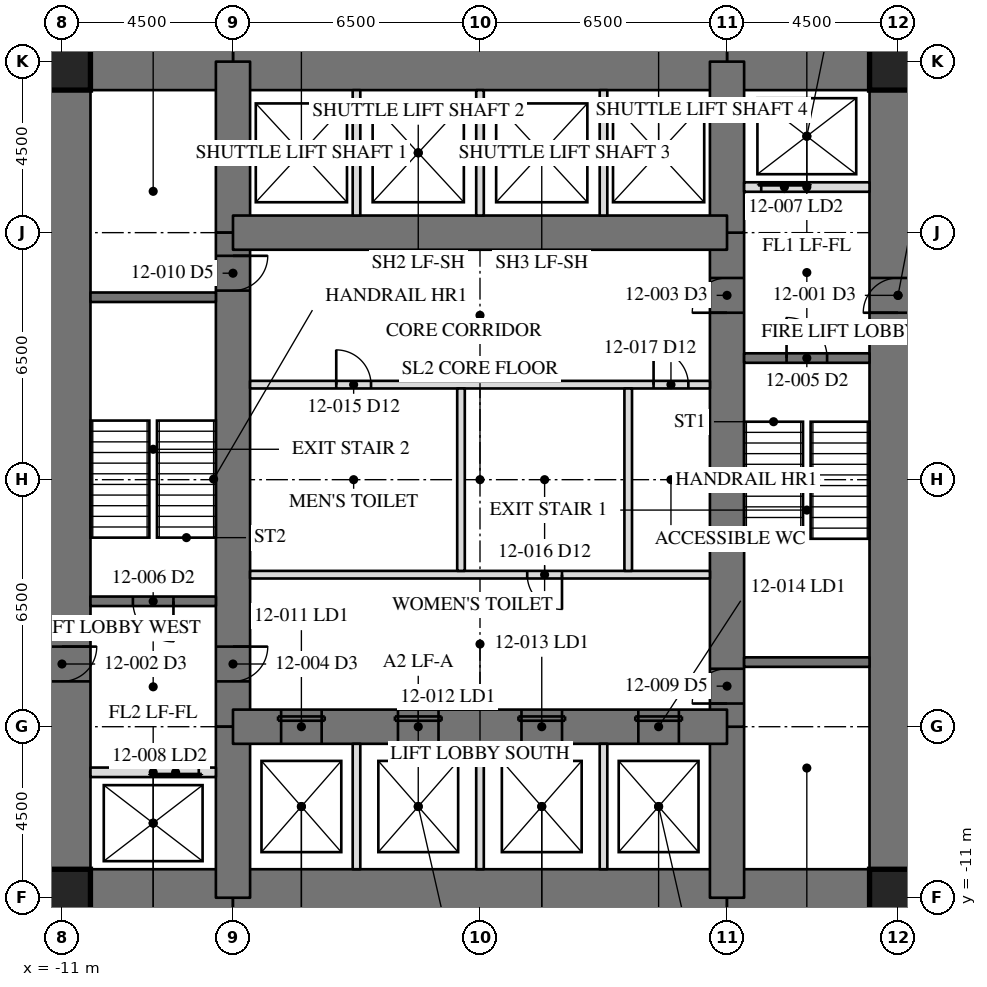
"""IFC4 building model, lengths in metres.
Left out: names, types, materials, properties, quantities, classifications, styles, units other than length and angle.
Written with IfcOpenShell. Run it as: python <this file> out.ifc"""

import sys

from ifc_helpers import new_model, si_unit, direction, frame, frame_2d, origin, origin_2d, place, context, subcontext, project, spatial, rectangle, hollow_rectangle, extrude, element, fill, save


model = new_model("IFC4")
c1 = context("Model", 3, precision=1e-05, world=origin(), true_north=direction((0.0, 1.0)))
c2 = subcontext(c1, "Body", "Model", "MODEL_VIEW")
j1 = project(units=[si_unit("LENGTHUNIT", "METRE"), si_unit("PLANEANGLEUNIT", "RADIAN")], contexts=[c1])
p1 = place(None, origin())
s1 = spatial("IfcSite", under=j1, at=p1, CompositionType="ELEMENT")
p2 = place(p1, origin())
s2 = spatial("IfcBuilding", under=s1, at=p2, CompositionType="ELEMENT")
p3 = place(p2, frame((0.0, 0.0, 52.9)))
s3 = spatial("IfcBuildingStorey", under=s2, at=p3, CompositionType="ELEMENT", Elevation=52.9)
p4 = place(p3, frame((11.0, -11.0, 0.0), z_axis=(0.0, 0.0, 1.0), x_axis=(0.0, 1.0, 0.0)))
e1 = element("IfcWall", 1, at=p4, inside=s3, PredefinedType="SHEAR", context=c2, shape_type="SweptSolid", body=[
    extrude(rectangle(XDim=22.0, YDim=1.5, at=frame_2d((11.0, 0.0))), origin(), (0.0, 0.0, 1.0), 4.1),
])
p5 = place(p4, frame((15.393, 0.0, 0.0)))
e2 = element("IfcOpeningElement", 2, at=p5, cuts=e1, PredefinedType="OPENING", context=c2, shape_type="SweptSolid", body=[
    extrude(rectangle(XDim=0.915, YDim=2.134, at=frame_2d((0.458, 1.067))), frame((0.0, 0.76, 0.0), z_axis=(0.0, -1.0, 0.0), x_axis=(1.0, 0.0, 0.0)), (0.0, 0.0, 1.0), 1.52),
])
p6 = place(p3, frame((-11.0, 11.0, 0.0), z_axis=(0.0, 0.0, 1.0), x_axis=(0.0, -1.0, 0.0)))
e3 = element("IfcWall", 3, at=p6, inside=s3, PredefinedType="SHEAR", context=c2, shape_type="SweptSolid", body=[
    extrude(rectangle(XDim=22.0, YDim=1.5, at=frame_2d((11.0, 0.0))), origin(), (0.0, 0.0, 1.0), 4.1),
])
p7 = place(p6, frame((15.393, 0.0, 0.0)))
e4 = element("IfcOpeningElement", 4, at=p7, cuts=e3, PredefinedType="OPENING", context=c2, shape_type="SweptSolid", body=[
    extrude(rectangle(XDim=0.915, YDim=2.134, at=frame_2d((0.458, 1.067))), frame((0.0, 0.76, 0.0), z_axis=(0.0, -1.0, 0.0), x_axis=(1.0, 0.0, 0.0)), (0.0, 0.0, 1.0), 1.52),
])
p8 = place(p3, frame((11.0, 11.0, 0.0), z_axis=(0.0, 0.0, 1.0), x_axis=(-1.0, 0.0, 0.0)))
e5 = element("IfcWall", 5, at=p8, inside=s3, PredefinedType="SHEAR", context=c2, shape_type="SweptSolid", body=[
    extrude(rectangle(XDim=4.5, YDim=1.5, at=frame_2d((2.25, 0.0))), origin(), (0.0, 0.0, 1.0), 4.1),
])
p9 = place(p3, frame((6.5, 11.0, 0.0), z_axis=(0.0, 0.0, 1.0), x_axis=(-1.0, 0.0, 0.0)))
e6 = element("IfcWall", 6, at=p9, inside=s3, PredefinedType="SHEAR", context=c2, shape_type="SweptSolid", body=[
    extrude(rectangle(XDim=13.0, YDim=1.5, at=frame_2d((6.5, 0.0))), origin(), (0.0, 0.0, 1.0), 4.1),
])
for number, where, z_axis, x_axis in (
    (7, (-6.5, 11.0, 0.0), (0.0, 0.0, 1.0), (-1.0, 0.0, 0.0)),
    (8, (-11.0, -11.0, 0.0), (0.0, 0.0, 1.0), (1.0, 0.0, 0.0)),
):
    element("IfcWall", number, at=place(p3, frame(where, z_axis=z_axis, x_axis=x_axis)), inside=s3, PredefinedType="SHEAR", context=c2, shape_type="SweptSolid", body=[
        extrude(rectangle(XDim=4.5, YDim=1.5, at=frame_2d((2.25, 0.0))), origin(), (0.0, 0.0, 1.0), 4.1),
    ])
p10 = place(p3, frame((-6.5, -11.0, 0.0), z_axis=(0.0, 0.0, 1.0), x_axis=(1.0, 0.0, 0.0)))
e9 = element("IfcWall", 9, at=p10, inside=s3, PredefinedType="SHEAR", context=c2, shape_type="SweptSolid", body=[
    extrude(rectangle(XDim=13.0, YDim=1.5, at=frame_2d((6.5, 0.0))), origin(), (0.0, 0.0, 1.0), 4.1),
])
p11 = place(p3, frame((6.5, -11.0, 0.0), z_axis=(0.0, 0.0, 1.0), x_axis=(1.0, 0.0, 0.0)))
e10 = element("IfcWall", 10, at=p11, inside=s3, PredefinedType="SHEAR", context=c2, shape_type="SweptSolid", body=[
    extrude(rectangle(XDim=4.5, YDim=1.5, at=frame_2d((2.25, 0.0))), origin(), (0.0, 0.0, 1.0), 4.1),
])
p12 = place(p3, frame((6.5, -11.0, 0.0), z_axis=(0.0, 0.0, 1.0), x_axis=(0.0, 1.0, 0.0)))
e11 = element("IfcWall", 11, at=p12, inside=s3, PredefinedType="SHEAR", context=c2, shape_type="SweptSolid", body=[
    extrude(rectangle(XDim=4.5, YDim=0.9, at=frame_2d((2.25, 0.0))), origin(), (0.0, 0.0, 1.0), 4.1),
])
p13 = place(p3, frame((6.5, -6.5, 0.0), z_axis=(0.0, 0.0, 1.0), x_axis=(0.0, 1.0, 0.0)))
e12 = element("IfcWall", 12, at=p13, inside=s3, PredefinedType="SHEAR", context=c2, shape_type="SweptSolid", body=[
    extrude(rectangle(XDim=13.0, YDim=0.9, at=frame_2d((6.5, 0.0))), origin(), (0.0, 0.0, 1.0), 4.1),
])
p14 = place(p13, frame((10.893, 0.0, 0.0)))
e13 = element("IfcOpeningElement", 13, at=p14, cuts=e12, PredefinedType="OPENING", context=c2, shape_type="SweptSolid", body=[
    extrude(rectangle(XDim=0.915, YDim=2.134, at=frame_2d((0.458, 1.067))), frame((0.0, 0.46, 0.0), z_axis=(0.0, -1.0, 0.0), x_axis=(1.0, 0.0, 0.0)), (0.0, 0.0, 1.0), 0.92),
])
p15 = place(p13, frame((0.61, 0.0, 0.0)))
e14 = element("IfcOpeningElement", 14, at=p15, cuts=e12, PredefinedType="OPENING", context=c2, shape_type="SweptSolid", body=[
    extrude(rectangle(XDim=0.915, YDim=2.134, at=frame_2d((0.458, 1.067))), frame((0.0, 0.46, 0.0), z_axis=(0.0, -1.0, 0.0), x_axis=(1.0, 0.0, 0.0)), (0.0, 0.0, 1.0), 0.92),
])
for number, where, z_axis, x_axis in (
    (15, (6.5, 6.5, 0.0), (0.0, 0.0, 1.0), (0.0, 1.0, 0.0)),
    (16, (-6.5, 11.0, 0.0), (0.0, 0.0, 1.0), (0.0, -1.0, 0.0)),
):
    element("IfcWall", number, at=place(p3, frame(where, z_axis=z_axis, x_axis=x_axis)), inside=s3, PredefinedType="SHEAR", context=c2, shape_type="SweptSolid", body=[
        extrude(rectangle(XDim=4.5, YDim=0.9, at=frame_2d((2.25, 0.0))), origin(), (0.0, 0.0, 1.0), 4.1),
    ])
p16 = place(p3, frame((-6.5, 6.5, 0.0), z_axis=(0.0, 0.0, 1.0), x_axis=(0.0, -1.0, 0.0)))
e17 = element("IfcWall", 17, at=p16, inside=s3, PredefinedType="SHEAR", context=c2, shape_type="SweptSolid", body=[
    extrude(rectangle(XDim=13.0, YDim=0.9, at=frame_2d((6.5, 0.0))), origin(), (0.0, 0.0, 1.0), 4.1),
])
p17 = place(p16, frame((10.893, 0.0, 0.0)))
e18 = element("IfcOpeningElement", 18, at=p17, cuts=e17, PredefinedType="OPENING", context=c2, shape_type="SweptSolid", body=[
    extrude(rectangle(XDim=0.915, YDim=2.134, at=frame_2d((0.458, 1.067))), frame((0.0, 0.46, 0.0), z_axis=(0.0, -1.0, 0.0), x_axis=(1.0, 0.0, 0.0)), (0.0, 0.0, 1.0), 0.92),
])
p18 = place(p16, frame((0.61, 0.0, 0.0)))
e19 = element("IfcOpeningElement", 19, at=p18, cuts=e17, PredefinedType="OPENING", context=c2, shape_type="SweptSolid", body=[
    extrude(rectangle(XDim=0.915, YDim=2.134, at=frame_2d((0.458, 1.067))), frame((0.0, 0.46, 0.0), z_axis=(0.0, -1.0, 0.0), x_axis=(1.0, 0.0, 0.0)), (0.0, 0.0, 1.0), 0.92),
])
p19 = place(p3, frame((-6.5, -6.5, 0.0), z_axis=(0.0, 0.0, 1.0), x_axis=(0.0, -1.0, 0.0)))
e20 = element("IfcWall", 20, at=p19, inside=s3, PredefinedType="SHEAR", context=c2, shape_type="SweptSolid", body=[
    extrude(rectangle(XDim=4.5, YDim=0.9, at=frame_2d((2.25, 0.0))), origin(), (0.0, 0.0, 1.0), 4.1),
])
p20 = place(p3, frame((6.5, 6.5, 0.0), z_axis=(0.0, 0.0, 1.0), x_axis=(-1.0, 0.0, 0.0)))
e21 = element("IfcWall", 21, at=p20, inside=s3, PredefinedType="SHEAR", context=c2, shape_type="SweptSolid", body=[
    extrude(rectangle(XDim=13.0, YDim=0.9, at=frame_2d((6.5, 0.0))), origin(), (0.0, 0.0, 1.0), 4.1),
])
p21 = place(p3, frame((-6.5, -6.5, 0.0), z_axis=(0.0, 0.0, 1.0), x_axis=(1.0, 0.0, 0.0)))
e22 = element("IfcWall", 22, at=p21, inside=s3, PredefinedType="SHEAR", context=c2, shape_type="SweptSolid", body=[
    extrude(rectangle(XDim=13.0, YDim=0.9, at=frame_2d((6.5, 0.0))), origin(), (0.0, 0.0, 1.0), 4.1),
])
p22 = place(p21, frame((1.267, 0.0, 0.0)))
e23 = element("IfcOpeningElement", 23, at=p22, cuts=e22, PredefinedType="OPENING", context=c2, shape_type="SweptSolid", body=[
    extrude(rectangle(XDim=1.067, YDim=2.134, at=frame_2d((0.533, 1.067))), frame((0.0, 0.46, 0.0), z_axis=(0.0, -1.0, 0.0), x_axis=(1.0, 0.0, 0.0)), (0.0, 0.0, 1.0), 0.92),
])
p23 = place(p21, frame((4.342, 0.0, 0.0)))
e24 = element("IfcOpeningElement", 24, at=p23, cuts=e22, PredefinedType="OPENING", context=c2, shape_type="SweptSolid", body=[
    extrude(rectangle(XDim=1.067, YDim=2.134, at=frame_2d((0.533, 1.067))), frame((0.0, 0.46, 0.0), z_axis=(0.0, -1.0, 0.0), x_axis=(1.0, 0.0, 0.0)), (0.0, 0.0, 1.0), 0.92),
])
p24 = place(p21, frame((7.592, 0.0, 0.0)))
e25 = element("IfcOpeningElement", 25, at=p24, cuts=e22, PredefinedType="OPENING", context=c2, shape_type="SweptSolid", body=[
    extrude(rectangle(XDim=1.067, YDim=2.134, at=frame_2d((0.533, 1.067))), frame((0.0, 0.46, 0.0), z_axis=(0.0, -1.0, 0.0), x_axis=(1.0, 0.0, 0.0)), (0.0, 0.0, 1.0), 0.92),
])
p25 = place(p21, frame((10.667, 0.0, 0.0)))
e26 = element("IfcOpeningElement", 26, at=p25, cuts=e22, PredefinedType="OPENING", context=c2, shape_type="SweptSolid", body=[
    extrude(rectangle(XDim=1.067, YDim=2.134, at=frame_2d((0.533, 1.067))), frame((0.0, 0.46, 0.0), z_axis=(0.0, -1.0, 0.0), x_axis=(1.0, 0.0, 0.0)), (0.0, 0.0, 1.0), 0.92),
])
for number, where, z_axis, x_axis in (
    (27, (11.0, 11.0, 0.0), (0.0, 0.0, 1.0), (1.0, 0.0, 0.0)),
    (28, (-11.0, 11.0, 0.0), (0.0, 0.0, 1.0), (1.0, 0.0, 0.0)),
    (29, (-11.0, -11.0, 0.0), (0.0, 0.0, 1.0), (1.0, 0.0, 0.0)),
    (30, (11.0, -11.0, 0.0), (0.0, 0.0, 1.0), (1.0, 0.0, 0.0)),
):
    element("IfcColumn", number, at=place(p3, frame(where, z_axis=z_axis, x_axis=x_axis)), inside=s3, PredefinedType="COLUMN", context=c2, shape_type="SweptSolid", body=[
        extrude(hollow_rectangle(XDim=1.499, YDim=1.499, WallThickness=0.102, at=origin_2d()), origin(), (0.0, 0.0, 1.0), 4.1),
    ])
for number, where, z_axis, x_axis in (
    (31, (6.95, -4.8, 0.0), (0.0, 0.0, 1.0), (1.0, 0.0, 0.0)),
    (32, (-6.95, 4.8, 0.0), (0.0, 0.0, 1.0), (-1.0, 0.0, 0.0)),
):
    element("IfcWall", number, at=place(p3, frame(where, z_axis=z_axis, x_axis=x_axis)), inside=s3, PredefinedType="SOLIDWALL", context=c2, shape_type="SweptSolid", body=[
        extrude(rectangle(XDim=3.3, YDim=0.25, at=frame_2d((1.65, 0.0))), origin(), (0.0, 0.0, 1.0), 3.91),
    ])
p26 = place(p3, frame((6.95, 3.2, 0.0), z_axis=(0.0, 0.0, 1.0), x_axis=(1.0, 0.0, 0.0)))
e33 = element("IfcWall", 33, at=p26, inside=s3, PredefinedType="SOLIDWALL", context=c2, shape_type="SweptSolid", body=[
    extrude(rectangle(XDim=3.3, YDim=0.25, at=frame_2d((1.65, 0.0))), origin(), (0.0, 0.0, 1.0), 3.91),
])
p27 = place(p26, frame((1.116, 0.0, 0.0)))
e34 = element("IfcOpeningElement", 34, at=p27, cuts=e33, PredefinedType="OPENING", context=c2, shape_type="SweptSolid", body=[
    extrude(rectangle(XDim=1.067, YDim=2.134, at=frame_2d((0.533, 1.067))), frame((0.0, 0.135, 0.0), z_axis=(0.0, -1.0, 0.0), x_axis=(1.0, 0.0, 0.0)), (0.0, 0.0, 1.0), 0.27),
])
p28 = place(p3, frame((-6.95, -3.2, 0.0), z_axis=(0.0, 0.0, 1.0), x_axis=(-1.0, 0.0, 0.0)))
e35 = element("IfcWall", 35, at=p28, inside=s3, PredefinedType="SOLIDWALL", context=c2, shape_type="SweptSolid", body=[
    extrude(rectangle(XDim=3.3, YDim=0.25, at=frame_2d((1.65, 0.0))), origin(), (0.0, 0.0, 1.0), 3.91),
])
p29 = place(p28, frame((1.116, 0.0, 0.0)))
e36 = element("IfcOpeningElement", 36, at=p29, cuts=e35, PredefinedType="OPENING", context=c2, shape_type="SweptSolid", body=[
    extrude(rectangle(XDim=1.067, YDim=2.134, at=frame_2d((0.533, 1.067))), frame((0.0, 0.135, 0.0), z_axis=(0.0, -1.0, 0.0), x_axis=(1.0, 0.0, 0.0)), (0.0, 0.0, 1.0), 0.27),
])
p30 = place(p3, frame((6.95, 7.7, 0.0), z_axis=(0.0, 0.0, 1.0), x_axis=(1.0, 0.0, 0.0)))
e37 = element("IfcWall", 37, at=p30, inside=s3, PredefinedType="PARTITIONING", context=c2, shape_type="SweptSolid", body=[
    extrude(rectangle(XDim=3.3, YDim=0.25, at=frame_2d((1.65, 0.0))), origin(), (0.0, 0.0, 1.0), 3.91),
])
p31 = place(p30, frame((0.45, 0.0, 0.0)))
e38 = element("IfcOpeningElement", 38, at=p31, cuts=e37, PredefinedType="OPENING", context=c2, shape_type="SweptSolid", body=[
    extrude(rectangle(XDim=1.219, YDim=2.134, at=frame_2d((0.609, 1.067))), frame((0.0, 0.135, 0.0), z_axis=(0.0, -1.0, 0.0), x_axis=(1.0, 0.0, 0.0)), (0.0, 0.0, 1.0), 0.27),
])
p32 = place(p3, frame((-6.95, -7.7, 0.0), z_axis=(0.0, 0.0, 1.0), x_axis=(-1.0, 0.0, 0.0)))
e39 = element("IfcWall", 39, at=p32, inside=s3, PredefinedType="PARTITIONING", context=c2, shape_type="SweptSolid", body=[
    extrude(rectangle(XDim=3.3, YDim=0.25, at=frame_2d((1.65, 0.0))), origin(), (0.0, 0.0, 1.0), 3.91),
])
p33 = place(p32, frame((0.45, 0.0, 0.0)))
e40 = element("IfcOpeningElement", 40, at=p33, cuts=e39, PredefinedType="OPENING", context=c2, shape_type="SweptSolid", body=[
    extrude(rectangle(XDim=1.219, YDim=2.134, at=frame_2d((0.609, 1.067))), frame((0.0, 0.135, 0.0), z_axis=(0.0, -1.0, 0.0), x_axis=(1.0, 0.0, 0.0)), (0.0, 0.0, 1.0), 0.27),
])
p34 = place(p3, frame((-6.05, 2.5, 0.0), z_axis=(0.0, 0.0, 1.0), x_axis=(1.0, 0.0, 0.0)))
e41 = element("IfcWall", 41, at=p34, inside=s3, PredefinedType="PARTITIONING", context=c2, shape_type="SweptSolid", body=[
    extrude(rectangle(XDim=12.1, YDim=0.2, at=frame_2d((6.05, 0.0))), origin(), (0.0, 0.0, 1.0), 3.91),
])
p35 = place(p34, frame((2.268, 0.0, 0.0)))
e42 = element("IfcOpeningElement", 42, at=p35, cuts=e41, PredefinedType="OPENING", context=c2, shape_type="SweptSolid", body=[
    extrude(rectangle(XDim=0.915, YDim=2.134, at=frame_2d((0.458, 1.067))), frame((0.0, 0.11, 0.0), z_axis=(0.0, -1.0, 0.0), x_axis=(1.0, 0.0, 0.0)), (0.0, 0.0, 1.0), 0.22),
])
p36 = place(p34, frame((10.617, 0.0, 0.0)))
e43 = element("IfcOpeningElement", 43, at=p36, cuts=e41, PredefinedType="OPENING", context=c2, shape_type="SweptSolid", body=[
    extrude(rectangle(XDim=0.915, YDim=2.134, at=frame_2d((0.458, 1.067))), frame((0.0, 0.11, 0.0), z_axis=(0.0, -1.0, 0.0), x_axis=(1.0, 0.0, 0.0)), (0.0, 0.0, 1.0), 0.22),
])
p37 = place(p3, frame((6.05, -2.5, 0.0), z_axis=(0.0, 0.0, 1.0), x_axis=(-1.0, 0.0, 0.0)))
e44 = element("IfcWall", 44, at=p37, inside=s3, PredefinedType="PARTITIONING", context=c2, shape_type="SweptSolid", body=[
    extrude(rectangle(XDim=12.1, YDim=0.2, at=frame_2d((6.05, 0.0))), origin(), (0.0, 0.0, 1.0), 3.91),
])
p38 = place(p37, frame((3.893, 0.0, 0.0)))
e45 = element("IfcOpeningElement", 45, at=p38, cuts=e44, PredefinedType="OPENING", context=c2, shape_type="SweptSolid", body=[
    extrude(rectangle(XDim=0.915, YDim=2.134, at=frame_2d((0.458, 1.067))), frame((0.0, 0.11, 0.0), z_axis=(0.0, -1.0, 0.0), x_axis=(1.0, 0.0, 0.0)), (0.0, 0.0, 1.0), 0.22),
])
for number, where, z_axis, x_axis in (
    (46, (-3.25, 6.95, 0.0), (0.0, 0.0, 1.0), (0.0, 1.0, 0.0)),
    (47, (0.0, 6.95, 0.0), (0.0, 0.0, 1.0), (0.0, 1.0, 0.0)),
    (48, (3.25, 6.95, 0.0), (0.0, 0.0, 1.0), (0.0, 1.0, 0.0)),
    (49, (-3.25, -10.25, 0.0), (0.0, 0.0, 1.0), (0.0, 1.0, 0.0)),
    (50, (0.0, -10.25, 0.0), (0.0, 0.0, 1.0), (0.0, 1.0, 0.0)),
    (51, (3.25, -10.25, 0.0), (0.0, 0.0, 1.0), (0.0, 1.0, 0.0)),
):
    element("IfcWall", number, at=place(p3, frame(where, z_axis=z_axis, x_axis=x_axis)), inside=s3, PredefinedType="PARTITIONING", context=c2, shape_type="SweptSolid", body=[
        extrude(rectangle(XDim=3.3, YDim=0.2, at=frame_2d((1.65, 0.0))), origin(), (0.0, 0.0, 1.0), 3.91),
    ])
for number, where, z_axis, x_axis in (
    (52, (-0.5, -2.4, 0.0), (0.0, 0.0, 1.0), (0.0, 1.0, 0.0)),
    (53, (3.9, -2.4, 0.0), (0.0, 0.0, 1.0), (0.0, 1.0, 0.0)),
):
    element("IfcWall", number, at=place(p3, frame(where, z_axis=z_axis, x_axis=x_axis)), inside=s3, PredefinedType="PARTITIONING", context=c2, shape_type="SweptSolid", body=[
        extrude(rectangle(XDim=4.8, YDim=0.2, at=frame_2d((2.4, 0.0))), origin(), (0.0, 0.0, 1.0), 3.91),
    ])
p39 = place(p14, origin())
e54 = element("IfcDoor", 54, at=p39, inside=s3, OperationType="SINGLE_SWING_RIGHT", PredefinedType="DOOR", context=c2, shape_type="SweptSolid", body=[
    extrude(rectangle(XDim=0.915, YDim=2.134, at=frame_2d((0.458, 1.067))), frame((0.0, -0.375, 0.0), z_axis=(0.0, -1.0, 0.0), x_axis=(1.0, 0.0, 0.0)), (0.0, 0.0, 1.0), 0.05),
])
fill(e13, e54)
p40 = place(p17, origin())
e55 = element("IfcDoor", 55, at=p40, inside=s3, OperationType="SINGLE_SWING_RIGHT", PredefinedType="DOOR", context=c2, shape_type="SweptSolid", body=[
    extrude(rectangle(XDim=0.915, YDim=2.134, at=frame_2d((0.458, 1.067))), frame((0.0, -0.375, 0.0), z_axis=(0.0, -1.0, 0.0), x_axis=(1.0, 0.0, 0.0)), (0.0, 0.0, 1.0), 0.05),
])
fill(e18, e55)
p41 = place(p27, origin())
e56 = element("IfcDoor", 56, at=p41, inside=s3, OperationType="SINGLE_SWING_LEFT", PredefinedType="DOOR", context=c2, shape_type="SweptSolid", body=[
    extrude(rectangle(XDim=1.067, YDim=2.134, at=frame_2d((0.533, 1.067))), frame((0.0, 0.025, 0.0), z_axis=(0.0, -1.0, 0.0), x_axis=(1.0, 0.0, 0.0)), (0.0, 0.0, 1.0), 0.05),
])
fill(e34, e56)
p42 = place(p29, origin())
e57 = element("IfcDoor", 57, at=p42, inside=s3, OperationType="SINGLE_SWING_LEFT", PredefinedType="DOOR", context=c2, shape_type="SweptSolid", body=[
    extrude(rectangle(XDim=1.067, YDim=2.134, at=frame_2d((0.533, 1.067))), frame((0.0, 0.025, 0.0), z_axis=(0.0, -1.0, 0.0), x_axis=(1.0, 0.0, 0.0)), (0.0, 0.0, 1.0), 0.05),
])
fill(e36, e57)
p43 = place(p31, origin())
e58 = element("IfcDoor", 58, at=p43, inside=s3, OperationType="SLIDING_TO_LEFT", PredefinedType="DOOR", context=c2, shape_type="SweptSolid", body=[
    extrude(rectangle(XDim=1.219, YDim=2.134, at=frame_2d((0.609, 1.067))), frame((0.0, 0.025, 0.0), z_axis=(0.0, -1.0, 0.0), x_axis=(1.0, 0.0, 0.0)), (0.0, 0.0, 1.0), 0.05),
])
fill(e38, e58)
p44 = place(p33, origin())
e59 = element("IfcDoor", 59, at=p44, inside=s3, OperationType="SLIDING_TO_LEFT", PredefinedType="DOOR", context=c2, shape_type="SweptSolid", body=[
    extrude(rectangle(XDim=1.219, YDim=2.134, at=frame_2d((0.609, 1.067))), frame((0.0, 0.025, 0.0), z_axis=(0.0, -1.0, 0.0), x_axis=(1.0, 0.0, 0.0)), (0.0, 0.0, 1.0), 0.05),
])
fill(e40, e59)
p45 = place(p15, origin())
e60 = element("IfcDoor", 60, at=p45, inside=s3, OperationType="SINGLE_SWING_RIGHT", PredefinedType="DOOR", context=c2, shape_type="SweptSolid", body=[
    extrude(rectangle(XDim=0.915, YDim=2.134, at=frame_2d((0.458, 1.067))), frame((0.0, -0.375, 0.0), z_axis=(0.0, -1.0, 0.0), x_axis=(1.0, 0.0, 0.0)), (0.0, 0.0, 1.0), 0.05),
])
fill(e14, e60)
p46 = place(p18, origin())
e61 = element("IfcDoor", 61, at=p46, inside=s3, OperationType="SINGLE_SWING_RIGHT", PredefinedType="DOOR", context=c2, shape_type="SweptSolid", body=[
    extrude(rectangle(XDim=0.915, YDim=2.134, at=frame_2d((0.458, 1.067))), frame((0.0, -0.375, 0.0), z_axis=(0.0, -1.0, 0.0), x_axis=(1.0, 0.0, 0.0)), (0.0, 0.0, 1.0), 0.05),
])
fill(e19, e61)
p47 = place(p22, origin())
e62 = element("IfcDoor", 62, at=p47, inside=s3, OperationType="SLIDING_TO_LEFT", PredefinedType="DOOR", context=c2, shape_type="SweptSolid", body=[
    extrude(rectangle(XDim=1.067, YDim=2.134, at=frame_2d((0.533, 1.067))), frame((0.0, -0.375, 0.0), z_axis=(0.0, -1.0, 0.0), x_axis=(1.0, 0.0, 0.0)), (0.0, 0.0, 1.0), 0.05),
])
fill(e23, e62)
p48 = place(p23, origin())
e63 = element("IfcDoor", 63, at=p48, inside=s3, OperationType="SLIDING_TO_LEFT", PredefinedType="DOOR", context=c2, shape_type="SweptSolid", body=[
    extrude(rectangle(XDim=1.067, YDim=2.134, at=frame_2d((0.533, 1.067))), frame((0.0, -0.375, 0.0), z_axis=(0.0, -1.0, 0.0), x_axis=(1.0, 0.0, 0.0)), (0.0, 0.0, 1.0), 0.05),
])
fill(e24, e63)
p49 = place(p24, origin())
e64 = element("IfcDoor", 64, at=p49, inside=s3, OperationType="SLIDING_TO_LEFT", PredefinedType="DOOR", context=c2, shape_type="SweptSolid", body=[
    extrude(rectangle(XDim=1.067, YDim=2.134, at=frame_2d((0.533, 1.067))), frame((0.0, -0.375, 0.0), z_axis=(0.0, -1.0, 0.0), x_axis=(1.0, 0.0, 0.0)), (0.0, 0.0, 1.0), 0.05),
])
fill(e25, e64)
p50 = place(p25, origin())
e65 = element("IfcDoor", 65, at=p50, inside=s3, OperationType="SLIDING_TO_LEFT", PredefinedType="DOOR", context=c2, shape_type="SweptSolid", body=[
    extrude(rectangle(XDim=1.067, YDim=2.134, at=frame_2d((0.533, 1.067))), frame((0.0, -0.375, 0.0), z_axis=(0.0, -1.0, 0.0), x_axis=(1.0, 0.0, 0.0)), (0.0, 0.0, 1.0), 0.05),
])
fill(e26, e65)
p51 = place(p35, origin())
e66 = element("IfcDoor", 66, at=p51, inside=s3, OperationType="SINGLE_SWING_LEFT", PredefinedType="DOOR", context=c2, shape_type="SweptSolid", body=[
    extrude(rectangle(XDim=0.915, YDim=2.134, at=frame_2d((0.458, 1.067))), frame((0.0, 0.025, 0.0), z_axis=(0.0, -1.0, 0.0), x_axis=(1.0, 0.0, 0.0)), (0.0, 0.0, 1.0), 0.05),
])
fill(e42, e66)
p52 = place(p38, origin())
e67 = element("IfcDoor", 67, at=p52, inside=s3, OperationType="SINGLE_SWING_LEFT", PredefinedType="DOOR", context=c2, shape_type="SweptSolid", body=[
    extrude(rectangle(XDim=0.915, YDim=2.134, at=frame_2d((0.458, 1.067))), frame((0.0, 0.025, 0.0), z_axis=(0.0, -1.0, 0.0), x_axis=(1.0, 0.0, 0.0)), (0.0, 0.0, 1.0), 0.05),
])
fill(e45, e67)
p53 = place(p36, origin())
e68 = element("IfcDoor", 68, at=p53, inside=s3, OperationType="SINGLE_SWING_LEFT", PredefinedType="DOOR", context=c2, shape_type="SweptSolid", body=[
    extrude(rectangle(XDim=0.915, YDim=2.134, at=frame_2d((0.458, 1.067))), frame((0.0, 0.025, 0.0), z_axis=(0.0, -1.0, 0.0), x_axis=(1.0, 0.0, 0.0)), (0.0, 0.0, 1.0), 0.05),
])
fill(e43, e68)
save(model, sys.argv[1])
